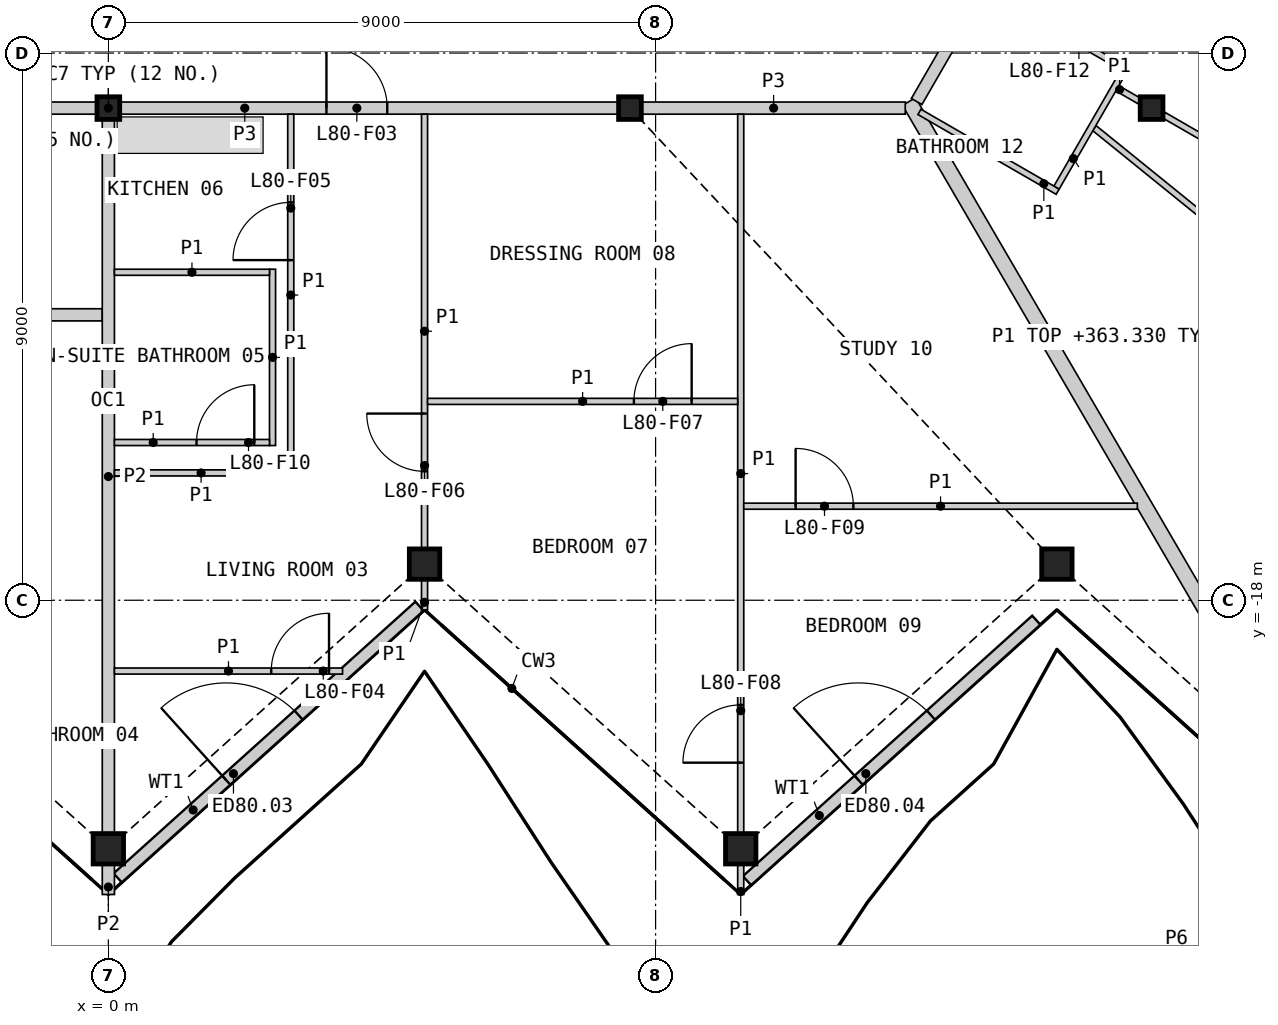
"""IFC4 building model, lengths in metres.
Left out: names, types, materials, properties, quantities, classifications, styles, units other than length and angle.
Written with IfcOpenShell. Run it as: python <this file> out.ifc"""

import sys

from ifc_helpers import new_model, si_unit, direction, frame, frame_2d, origin, origin_2d, place, context, subcontext, project, spatial, rectangle, hollow_rectangle, i_section, extrude, element, fill, save


model = new_model("IFC4")
c1 = context("Model", 3, precision=1e-05, world=origin(), true_north=direction((0.0, 1.0)))
c2 = subcontext(c1, "Body", "Model", "MODEL_VIEW")
j1 = project(units=[si_unit("LENGTHUNIT", "METRE"), si_unit("PLANEANGLEUNIT", "RADIAN")], contexts=[c1])
p1 = place(None, origin())
s1 = spatial("IfcSite", under=j1, at=p1, CompositionType="ELEMENT")
p2 = place(p1, origin())
s2 = spatial("IfcBuilding", under=s1, at=p2, CompositionType="ELEMENT")
p3 = place(p2, frame((0.0, 0.0, 361.0)))
s3 = spatial("IfcBuildingStorey", under=s2, at=p3, CompositionType="ELEMENT", Elevation=361.0)
for number, where, z_axis, x_axis in (
    (1, (0.0, -22.088, 0.0), (0.0, 0.0, 1.0), (1.0, 0.0, 0.0)),
    (2, (5.2, -17.406, 0.0), (0.0, 0.0, 1.0), (1.0, 0.0, 0.0)),
    (3, (10.4, -22.088, 0.0), (0.0, 0.0, 1.0), (1.0, 0.0, 0.0)),
    (4, (15.6, -17.406, 0.0), (0.0, 0.0, 1.0), (1.0, 0.0, 0.0)),
):
    element("IfcColumn", number, at=place(p3, frame(where, z_axis=z_axis, x_axis=x_axis)), inside=s3, PredefinedType="COLUMN", context=c2, shape_type="SweptSolid", body=[
        extrude(hollow_rectangle(XDim=0.5, YDim=0.5, WallThickness=0.03, at=origin_2d()), origin(), (0.0, 0.0, 1.0), 3.4),
    ])
for number, where, z_axis, x_axis in (
    (5, (0.0, -9.906, 0.0), (0.0, 0.0, 1.0), (1.0, 0.0, 0.0)),
    (6, (8.578, -9.906, 0.0), (0.0, 0.0, 1.0), (1.0, 0.0, 0.0)),
    (7, (17.157, -9.906, 0.0), (0.0, 0.0, 1.0), (1.0, 0.0, 0.0)),
):
    element("IfcColumn", number, at=place(p3, frame(where, z_axis=z_axis, x_axis=x_axis)), inside=s3, PredefinedType="COLUMN", context=c2, shape_type="SweptSolid", body=[
        extrude(i_section(OverallWidth=0.374, OverallDepth=0.372, WebThickness=0.016, FlangeThickness=0.026, at=origin_2d()), origin(), (0.0, 0.0, 1.0), 3.4),
    ])
p4 = place(p3, frame((0.154, -22.567, 0.0), z_axis=(0.0, 0.0, 1.0), x_axis=(0.743150529995, 0.669124270796, 0.0)))
e8 = element("IfcWall", 8, at=p4, inside=s3, PredefinedType="SOLIDWALL", context=c2, shape_type="SweptSolid", body=[
    extrude(rectangle(XDim=6.678, YDim=0.2, at=frame_2d((3.339, 0.0))), origin(), (0.0, 0.0, 1.0), 2.634),
])
p5 = place(p4, frame((2.402, 0.0, 0.0)))
e9 = element("IfcOpeningElement", 9, at=p5, cuts=e8, PredefinedType="OPENING", context=c2, shape_type="SweptSolid", body=[
    extrude(rectangle(XDim=1.6, YDim=2.25, at=frame_2d((0.8, 1.125))), frame((0.0, 0.11, 0.0), z_axis=(0.0, -1.0, 0.0), x_axis=(1.0, 0.0, 0.0)), (0.0, 0.0, 1.0), 0.22),
])
p6 = place(p3, frame((10.503, -22.612, 0.0), z_axis=(0.0, 0.0, 1.0), x_axis=(0.743148117717, 0.669126949939, 0.0)))
e10 = element("IfcWall", 10, at=p6, inside=s3, PredefinedType="SOLIDWALL", context=c2, shape_type="SweptSolid", body=[
    extrude(rectangle(XDim=6.402, YDim=0.2, at=frame_2d((3.201, 0.0))), origin(), (0.0, 0.0, 1.0), 2.634),
])
p7 = place(p6, frame((2.469, 0.0, 0.0)))
e11 = element("IfcOpeningElement", 11, at=p7, cuts=e10, PredefinedType="OPENING", context=c2, shape_type="SweptSolid", body=[
    extrude(rectangle(XDim=1.6, YDim=2.25, at=frame_2d((0.8, 1.125))), frame((0.0, 0.11, 0.0), z_axis=(0.0, -1.0, 0.0), x_axis=(1.0, 0.0, 0.0)), (0.0, 0.0, 1.0), 0.22),
])
p8 = place(p3, frame((13.168, -9.798, 0.0), z_axis=(0.0, 0.0, 1.0), x_axis=(0.503632750219, -0.863917850786, 0.0)))
e12 = element("IfcWall", 12, at=p8, inside=s3, PredefinedType="PARTITIONING", context=c2, shape_type="SweptSolid", body=[
    extrude(rectangle(XDim=14.972, YDim=0.25, at=frame_2d((7.486, 0.0))), origin(), (0.0, 0.0, 1.0), 2.33),
])
p9 = place(p3, frame((-8.382, -9.906, 0.0), z_axis=(0.0, 0.0, 1.0), x_axis=(1.0, 0.0, 0.0)))
e13 = element("IfcWall", 13, at=p9, inside=s3, PredefinedType="PARTITIONING", context=c2, shape_type="SweptSolid", body=[
    extrude(rectangle(XDim=8.185, YDim=0.2, at=frame_2d((4.092, 0.0))), origin(), (0.0, 0.0, 1.0), 3.1),
])
p10 = place(p9, frame((3.567, 0.0, 0.0)))
e14 = element("IfcOpeningElement", 14, at=p10, cuts=e13, PredefinedType="OPENING", context=c2, shape_type="SweptSolid", body=[
    extrude(rectangle(XDim=0.95, YDim=2.1, at=frame_2d((0.475, 1.05))), frame((0.0, 0.11, 0.0), z_axis=(0.0, -1.0, 0.0), x_axis=(1.0, 0.0, 0.0)), (0.0, 0.0, 1.0), 0.22),
])
p11 = place(p3, frame((0.197, -9.906, 0.0), z_axis=(0.0, 0.0, 1.0), x_axis=(1.0, 0.0, 0.0)))
e15 = element("IfcWall", 15, at=p11, inside=s3, PredefinedType="PARTITIONING", context=c2, shape_type="SweptSolid", body=[
    extrude(rectangle(XDim=8.185, YDim=0.2, at=frame_2d((4.092, 0.0))), origin(), (0.0, 0.0, 1.0), 3.1),
])
p12 = place(p11, frame((3.39, 0.0, 0.0)))
e16 = element("IfcOpeningElement", 16, at=p12, cuts=e15, PredefinedType="OPENING", context=c2, shape_type="SweptSolid", body=[
    extrude(rectangle(XDim=1.0, YDim=2.1, at=frame_2d((0.5, 1.05))), frame((0.0, 0.11, 0.0), z_axis=(0.0, -1.0, 0.0), x_axis=(1.0, 0.0, 0.0)), (0.0, 0.0, 1.0), 0.22),
])
p13 = place(p3, frame((8.775, -9.906, 0.0), z_axis=(0.0, 0.0, 1.0), x_axis=(1.0, 0.0, 0.0)))
e17 = element("IfcWall", 17, at=p13, inside=s3, PredefinedType="PARTITIONING", context=c2, shape_type="SweptSolid", body=[
    extrude(rectangle(XDim=4.331, YDim=0.2, at=frame_2d((2.165, 0.0))), origin(), (0.0, 0.0, 1.0), 3.1),
])
p14 = place(p3, frame((13.293, -9.797, 0.0), z_axis=(0.0, 0.0, 1.0), x_axis=(0.499977520935, 0.86603838169, 0.0)))
e18 = element("IfcWall", 18, at=p14, inside=s3, PredefinedType="PARTITIONING", context=c2, shape_type="SweptSolid", body=[
    extrude(rectangle(XDim=3.701, YDim=0.2, at=frame_2d((1.851, 0.0))), origin(), (0.0, 0.0, 1.0), 3.1),
])
p15 = place(p14, frame((2.451, 0.0, 0.0)))
e19 = element("IfcOpeningElement", 19, at=p15, cuts=e18, PredefinedType="OPENING", context=c2, shape_type="SweptSolid", body=[
    extrude(rectangle(XDim=1.0, YDim=2.1, at=frame_2d((0.5, 1.05))), frame((0.0, 0.11, 0.0), z_axis=(0.0, -1.0, 0.0), x_axis=(1.0, 0.0, 0.0)), (0.0, 0.0, 1.0), 0.22),
])
p16 = place(p3, frame((-15.094, -13.306, 0.0), z_axis=(0.0, 0.0, 1.0), x_axis=(1.0, 0.0, 0.0)))
e20 = element("IfcWall", 20, at=p16, inside=s3, PredefinedType="PARTITIONING", context=c2, shape_type="SweptSolid", body=[
    extrude(rectangle(XDim=14.994, YDim=0.2, at=frame_2d((7.497, 0.0))), origin(), (0.0, 0.0, 1.0), 2.33),
])
p17 = place(p16, frame((6.27, 0.0, 0.0)))
e21 = element("IfcOpeningElement", 21, at=p17, cuts=e20, PredefinedType="OPENING", context=c2, shape_type="SweptSolid", body=[
    extrude(rectangle(XDim=0.95, YDim=2.1, at=frame_2d((0.475, 1.05))), frame((0.0, 0.11, 0.0), z_axis=(0.0, -1.0, 0.0), x_axis=(1.0, 0.0, 0.0)), (0.0, 0.0, 1.0), 0.22),
])
p18 = place(p3, frame((0.0, -21.828, 0.0), z_axis=(0.0, 0.0, 1.0), x_axis=(0.0, 1.0, 0.0)))
e22 = element("IfcWall", 22, at=p18, inside=s3, PredefinedType="PARTITIONING", context=c2, shape_type="SweptSolid", body=[
    extrude(rectangle(XDim=11.725, YDim=0.2, at=frame_2d((5.863, 0.0))), origin(), (0.0, 0.0, 1.0), 2.33),
])
p19 = place(p3, frame((0.0, -22.839, 0.0), z_axis=(0.0, 0.0, 1.0), x_axis=(0.0, 1.0, 0.0)))
e23 = element("IfcWall", 23, at=p19, inside=s3, PredefinedType="PARTITIONING", context=c2, shape_type="SweptSolid", body=[
    extrude(rectangle(XDim=0.491, YDim=0.2, at=frame_2d((0.246, 0.0))), origin(), (0.0, 0.0, 1.0), 2.33),
])
p20 = place(p3, frame((16.216, -10.234, 0.0), z_axis=(0.0, 0.0, 1.0), x_axis=(0.777145059662, -0.629321504672, 0.0)))
e24 = element("IfcWall", 24, at=p20, inside=s3, PredefinedType="PARTITIONING", context=c2, shape_type="SweptSolid", body=[
    extrude(rectangle(XDim=12.59, YDim=0.1, at=frame_2d((6.295, 0.0))), origin(), (0.0, 0.0, 1.0), 2.33),
])
p21 = place(p20, frame((7.074, 0.0, 0.0)))
e25 = element("IfcOpeningElement", 25, at=p21, cuts=e24, PredefinedType="OPENING", context=c2, shape_type="SweptSolid", body=[
    extrude(rectangle(XDim=0.95, YDim=2.1, at=frame_2d((0.475, 1.05))), frame((0.0, 0.06, 0.0), z_axis=(0.0, -1.0, 0.0), x_axis=(1.0, 0.0, 0.0)), (0.0, 0.0, 1.0), 0.12),
])
p22 = place(p3, frame((10.4, -21.828, 0.0), z_axis=(0.0, 0.0, 1.0), x_axis=(0.0, 1.0, 0.0)))
e26 = element("IfcWall", 26, at=p22, inside=s3, PredefinedType="PARTITIONING", context=c2, shape_type="SweptSolid", body=[
    extrude(rectangle(XDim=11.822, YDim=0.1, at=frame_2d((5.911, 0.0))), origin(), (0.0, 0.0, 1.0), 2.33),
])
p23 = place(p22, frame((1.156, 0.0, 0.0)))
e27 = element("IfcOpeningElement", 27, at=p23, cuts=e26, PredefinedType="OPENING", context=c2, shape_type="SweptSolid", body=[
    extrude(rectangle(XDim=0.95, YDim=2.1, at=frame_2d((0.475, 1.05))), frame((0.0, 0.06, 0.0), z_axis=(0.0, -1.0, 0.0), x_axis=(1.0, 0.0, 0.0)), (0.0, 0.0, 1.0), 0.12),
])
p24 = place(p3, frame((17.354, -10.019, 0.0), z_axis=(0.0, 0.0, 1.0), x_axis=(0.866019680922, -0.500009912158, 0.0)))
e28 = element("IfcWall", 28, at=p24, inside=s3, PredefinedType="PARTITIONING", context=c2, shape_type="SweptSolid", body=[
    extrude(rectangle(XDim=10.881, YDim=0.1, at=frame_2d((5.44, 0.0))), origin(), (0.0, 0.0, 1.0), 2.33),
])
p25 = place(p24, frame((1.655, 0.0, 0.0)))
e29 = element("IfcOpeningElement", 29, at=p25, cuts=e28, PredefinedType="OPENING", context=c2, shape_type="SweptSolid", body=[
    extrude(rectangle(XDim=0.95, YDim=2.1, at=frame_2d((0.475, 1.05))), frame((0.0, 0.06, 0.0), z_axis=(0.0, -1.0, 0.0), x_axis=(1.0, 0.0, 0.0)), (0.0, 0.0, 1.0), 0.12),
])
p26 = place(p3, frame((5.2, -17.146, 0.0), z_axis=(0.0, 0.0, 1.0), x_axis=(0.0, 1.0, 0.0)))
e30 = element("IfcWall", 30, at=p26, inside=s3, PredefinedType="PARTITIONING", context=c2, shape_type="SweptSolid", body=[
    extrude(rectangle(XDim=7.14, YDim=0.1, at=frame_2d((3.57, 0.0))), origin(), (0.0, 0.0, 1.0), 2.33),
])
p27 = place(p26, frame((1.266, 0.0, 0.0)))
e31 = element("IfcOpeningElement", 31, at=p27, cuts=e30, PredefinedType="OPENING", context=c2, shape_type="SweptSolid", body=[
    extrude(rectangle(XDim=0.95, YDim=2.1, at=frame_2d((0.475, 1.05))), frame((0.0, 0.06, 0.0), z_axis=(0.0, -1.0, 0.0), x_axis=(1.0, 0.0, 0.0)), (0.0, 0.0, 1.0), 0.12),
])
p28 = place(p3, frame((10.45, -16.453, 0.0), z_axis=(0.0, 0.0, 1.0), x_axis=(1.0, 0.0, 0.0)))
e32 = element("IfcWall", 32, at=p28, inside=s3, PredefinedType="PARTITIONING", context=c2, shape_type="SweptSolid", body=[
    extrude(rectangle(XDim=6.473, YDim=0.1, at=frame_2d((3.236, 0.0))), origin(), (0.0, 0.0, 1.0), 2.33),
])
p29 = place(p28, frame((0.853, 0.0, 0.0)))
e33 = element("IfcOpeningElement", 33, at=p29, cuts=e32, PredefinedType="OPENING", context=c2, shape_type="SweptSolid", body=[
    extrude(rectangle(XDim=0.95, YDim=2.1, at=frame_2d((0.475, 1.05))), frame((0.0, 0.06, 0.0), z_axis=(0.0, -1.0, 0.0), x_axis=(1.0, 0.0, 0.0)), (0.0, 0.0, 1.0), 0.12),
])
p30 = place(p3, frame((3.0, -15.956, 0.0), z_axis=(0.0, 0.0, 1.0), x_axis=(0.0, 1.0, 0.0)))
e34 = element("IfcWall", 34, at=p30, inside=s3, PredefinedType="PARTITIONING", context=c2, shape_type="SweptSolid", body=[
    extrude(rectangle(XDim=5.95, YDim=0.1, at=frame_2d((2.975, 0.0))), origin(), (0.0, 0.0, 1.0), 2.33),
])
p31 = place(p30, frame((3.55, 0.0, 0.0)))
e35 = element("IfcOpeningElement", 35, at=p31, cuts=e34, PredefinedType="OPENING", context=c2, shape_type="SweptSolid", body=[
    extrude(rectangle(XDim=0.95, YDim=2.1, at=frame_2d((0.475, 1.05))), frame((0.0, 0.06, 0.0), z_axis=(0.0, -1.0, 0.0), x_axis=(1.0, 0.0, 0.0)), (0.0, 0.0, 1.0), 0.12),
])
p32 = place(p3, frame((5.25, -14.729, 0.0), z_axis=(0.0, 0.0, 1.0), x_axis=(1.0, 0.0, 0.0)))
e36 = element("IfcWall", 36, at=p32, inside=s3, PredefinedType="PARTITIONING", context=c2, shape_type="SweptSolid", body=[
    extrude(rectangle(XDim=5.1, YDim=0.1, at=frame_2d((2.55, 0.0))), origin(), (0.0, 0.0, 1.0), 2.33),
])
p33 = place(p32, frame((3.393, 0.0, 0.0)))
e37 = element("IfcOpeningElement", 37, at=p33, cuts=e36, PredefinedType="OPENING", context=c2, shape_type="SweptSolid", body=[
    extrude(rectangle(XDim=0.95, YDim=2.1, at=frame_2d((0.475, 1.05))), frame((0.0, 0.06, 0.0), z_axis=(0.0, -1.0, 0.0), x_axis=(1.0, 0.0, 0.0)), (0.0, 0.0, 1.0), 0.12),
])
p34 = place(p3, frame((0.1, -19.164, 0.0), z_axis=(0.0, 0.0, 1.0), x_axis=(1.0, 0.0, 0.0)))
e38 = element("IfcWall", 38, at=p34, inside=s3, PredefinedType="PARTITIONING", context=c2, shape_type="SweptSolid", body=[
    extrude(rectangle(XDim=3.751, YDim=0.1, at=frame_2d((1.876, 0.0))), origin(), (0.0, 0.0, 1.0), 2.33),
])
p35 = place(p34, frame((2.579, 0.0, 0.0)))
e39 = element("IfcOpeningElement", 39, at=p35, cuts=e38, PredefinedType="OPENING", context=c2, shape_type="SweptSolid", body=[
    extrude(rectangle(XDim=0.95, YDim=2.1, at=frame_2d((0.475, 1.05))), frame((0.0, 0.06, 0.0), z_axis=(0.0, -1.0, 0.0), x_axis=(1.0, 0.0, 0.0)), (0.0, 0.0, 1.0), 0.12),
])
p36 = place(p3, frame((0.1, -15.906, 0.0), z_axis=(0.0, 0.0, 1.0), x_axis=(1.0, 0.0, 0.0)))
e40 = element("IfcWall", 40, at=p36, inside=s3, PredefinedType="PARTITIONING", context=c2, shape_type="SweptSolid", body=[
    extrude(rectangle(XDim=2.85, YDim=0.1, at=frame_2d((1.425, 0.0))), origin(), (0.0, 0.0, 1.0), 2.33),
])
p37 = place(p3, frame((2.7, -15.456, 0.0), z_axis=(0.0, 0.0, 1.0), x_axis=(0.0, 1.0, 0.0)))
e41 = element("IfcWall", 41, at=p37, inside=s3, PredefinedType="PARTITIONING", context=c2, shape_type="SweptSolid", body=[
    extrude(rectangle(XDim=2.9, YDim=0.1, at=frame_2d((1.45, 0.0))), origin(), (0.0, 0.0, 1.0), 2.33),
])
p38 = place(p3, frame((14.467, -7.964, 0.0), z_axis=(0.0, 0.0, 1.0), x_axis=(0.86601223543, -0.500022807565, 0.0)))
e42 = element("IfcWall", 42, at=p38, inside=s3, PredefinedType="PARTITIONING", context=c2, shape_type="SweptSolid", body=[
    extrude(rectangle(XDim=2.65, YDim=0.1, at=frame_2d((1.325, 0.0))), origin(), (0.0, 0.0, 1.0), 2.33),
])
p39 = place(p38, frame((1.014, 0.0, 0.0)))
e43 = element("IfcOpeningElement", 43, at=p39, cuts=e42, PredefinedType="OPENING", context=c2, shape_type="SweptSolid", body=[
    extrude(rectangle(XDim=0.95, YDim=2.1, at=frame_2d((0.475, 1.05))), frame((0.0, 0.06, 0.0), z_axis=(0.0, -1.0, 0.0), x_axis=(1.0, 0.0, 0.0)), (0.0, 0.0, 1.0), 0.12),
])
p40 = place(p3, frame((0.1, -12.606, 0.0), z_axis=(0.0, 0.0, 1.0), x_axis=(1.0, 0.0, 0.0)))
e44 = element("IfcWall", 44, at=p40, inside=s3, PredefinedType="PARTITIONING", context=c2, shape_type="SweptSolid", body=[
    extrude(rectangle(XDim=2.55, YDim=0.1, at=frame_2d((1.275, 0.0))), origin(), (0.0, 0.0, 1.0), 2.33),
])
p41 = place(p3, frame((0.1, -15.406, 0.0), z_axis=(0.0, 0.0, 1.0), x_axis=(1.0, 0.0, 0.0)))
e45 = element("IfcWall", 45, at=p41, inside=s3, PredefinedType="PARTITIONING", context=c2, shape_type="SweptSolid", body=[
    extrude(rectangle(XDim=2.55, YDim=0.1, at=frame_2d((1.275, 0.0))), origin(), (0.0, 0.0, 1.0), 2.33),
])
p42 = place(p41, frame((1.35, 0.0, 0.0)))
e46 = element("IfcOpeningElement", 46, at=p42, cuts=e45, PredefinedType="OPENING", context=c2, shape_type="SweptSolid", body=[
    extrude(rectangle(XDim=0.95, YDim=2.1, at=frame_2d((0.475, 1.05))), frame((0.0, 0.06, 0.0), z_axis=(0.0, -1.0, 0.0), x_axis=(1.0, 0.0, 0.0)), (0.0, 0.0, 1.0), 0.12),
])
p43 = place(p3, frame((13.339, -9.968, 0.0), z_axis=(0.0, 0.0, 1.0), x_axis=(0.866013657776, -0.500020344131, 0.0)))
e47 = element("IfcWall", 47, at=p43, inside=s3, PredefinedType="PARTITIONING", context=c2, shape_type="SweptSolid", body=[
    extrude(rectangle(XDim=2.625, YDim=0.1, at=frame_2d((1.312, 0.0))), origin(), (0.0, 0.0, 1.0), 2.33),
])
p44 = place(p3, frame((15.594, -11.212, 0.0), z_axis=(0.0, 0.0, 1.0), x_axis=(0.499981787252, 0.866035918664, 0.0)))
e48 = element("IfcWall", 48, at=p44, inside=s3, PredefinedType="PARTITIONING", context=c2, shape_type="SweptSolid", body=[
    extrude(rectangle(XDim=2.2, YDim=0.1, at=frame_2d((1.1, 0.0))), origin(), (0.0, 0.0, 1.0), 2.33),
])
for number, where, z_axis, x_axis in (
    (49, (10.4, -22.839, 0.0), (0.0, 0.0, 1.0), (0.0, 1.0, 0.0)),
    (50, (5.2, -18.157, 0.0), (0.0, 0.0, 1.0), (0.0, 1.0, 0.0)),
):
    element("IfcWall", number, at=place(p3, frame(where, z_axis=z_axis, x_axis=x_axis)), inside=s3, PredefinedType="PARTITIONING", context=c2, shape_type="SweptSolid", body=[
        extrude(rectangle(XDim=0.491, YDim=0.1, at=frame_2d((0.246, 0.0))), origin(), (0.0, 0.0, 1.0), 2.33),
    ])
p45 = place(p3, frame((16.594, -9.581, 0.0), z_axis=(0.0, 0.0, 1.0), x_axis=(0.866137484628, -0.499805820016, 0.0)))
e51 = element("IfcWall", 51, at=p45, inside=s3, PredefinedType="PARTITIONING", context=c2, shape_type="SweptSolid", body=[
    extrude(rectangle(XDim=0.423, YDim=0.1, at=frame_2d((0.211, 0.0))), origin(), (0.0, 0.0, 1.0), 2.33),
])
p46 = place(p5, origin())
e52 = element("IfcDoor", 52, at=p46, inside=s3, OperationType="DOUBLE_DOOR_SINGLE_SWING", PredefinedType="DOOR", context=c2, shape_type="SweptSolid", body=[
    extrude(rectangle(XDim=1.6, YDim=2.25, at=frame_2d((0.8, 1.125))), frame((0.0, 0.025, 0.0), z_axis=(0.0, -1.0, 0.0), x_axis=(1.0, 0.0, 0.0)), (0.0, 0.0, 1.0), 0.05),
])
fill(e9, e52)
p47 = place(p7, origin())
e53 = element("IfcDoor", 53, at=p47, inside=s3, OperationType="DOUBLE_DOOR_SINGLE_SWING", PredefinedType="DOOR", context=c2, shape_type="SweptSolid", body=[
    extrude(rectangle(XDim=1.6, YDim=2.25, at=frame_2d((0.8, 1.125))), frame((0.0, 0.025, 0.0), z_axis=(0.0, -1.0, 0.0), x_axis=(1.0, 0.0, 0.0)), (0.0, 0.0, 1.0), 0.05),
])
fill(e11, e53)
p48 = place(p12, origin())
e54 = element("IfcDoor", 54, at=p48, inside=s3, OperationType="SINGLE_SWING_LEFT", PredefinedType="DOOR", context=c2, shape_type="SweptSolid", body=[
    extrude(rectangle(XDim=1.0, YDim=2.1, at=frame_2d((0.5, 1.05))), frame((0.0, 0.025, 0.0), z_axis=(0.0, -1.0, 0.0), x_axis=(1.0, 0.0, 0.0)), (0.0, 0.0, 1.0), 0.05),
])
fill(e16, e54)
p49 = place(p35, origin())
e55 = element("IfcDoor", 55, at=p49, inside=s3, OperationType="SINGLE_SWING_RIGHT", PredefinedType="DOOR", context=c2, shape_type="SweptSolid", body=[
    extrude(rectangle(XDim=0.95, YDim=2.1, at=frame_2d((0.475, 1.05))), frame((0.0, 0.025, 0.0), z_axis=(0.0, -1.0, 0.0), x_axis=(1.0, 0.0, 0.0)), (0.0, 0.0, 1.0), 0.05),
])
fill(e39, e55)
p50 = place(p31, origin())
e56 = element("IfcDoor", 56, at=p50, inside=s3, OperationType="SINGLE_SWING_LEFT", PredefinedType="DOOR", context=c2, shape_type="SweptSolid", body=[
    extrude(rectangle(XDim=0.95, YDim=2.1, at=frame_2d((0.475, 1.05))), frame((0.0, 0.025, 0.0), z_axis=(0.0, -1.0, 0.0), x_axis=(1.0, 0.0, 0.0)), (0.0, 0.0, 1.0), 0.05),
])
fill(e35, e56)
p51 = place(p27, origin())
e57 = element("IfcDoor", 57, at=p51, inside=s3, OperationType="SINGLE_SWING_RIGHT", PredefinedType="DOOR", context=c2, shape_type="SweptSolid", body=[
    extrude(rectangle(XDim=0.95, YDim=2.1, at=frame_2d((0.475, 1.05))), frame((0.0, 0.025, 0.0), z_axis=(0.0, -1.0, 0.0), x_axis=(1.0, 0.0, 0.0)), (0.0, 0.0, 1.0), 0.05),
])
fill(e31, e57)
p52 = place(p33, origin())
e58 = element("IfcDoor", 58, at=p52, inside=s3, OperationType="SINGLE_SWING_RIGHT", PredefinedType="DOOR", context=c2, shape_type="SweptSolid", body=[
    extrude(rectangle(XDim=0.95, YDim=2.1, at=frame_2d((0.475, 1.05))), frame((0.0, 0.025, 0.0), z_axis=(0.0, -1.0, 0.0), x_axis=(1.0, 0.0, 0.0)), (0.0, 0.0, 1.0), 0.05),
])
fill(e37, e58)
p53 = place(p23, origin())
e59 = element("IfcDoor", 59, at=p53, inside=s3, OperationType="SINGLE_SWING_LEFT", PredefinedType="DOOR", context=c2, shape_type="SweptSolid", body=[
    extrude(rectangle(XDim=0.95, YDim=2.1, at=frame_2d((0.475, 1.05))), frame((0.0, 0.025, 0.0), z_axis=(0.0, -1.0, 0.0), x_axis=(1.0, 0.0, 0.0)), (0.0, 0.0, 1.0), 0.05),
])
fill(e27, e59)
p54 = place(p29, origin())
e60 = element("IfcDoor", 60, at=p54, inside=s3, OperationType="SINGLE_SWING_LEFT", PredefinedType="DOOR", context=c2, shape_type="SweptSolid", body=[
    extrude(rectangle(XDim=0.95, YDim=2.1, at=frame_2d((0.475, 1.05))), frame((0.0, 0.025, 0.0), z_axis=(0.0, -1.0, 0.0), x_axis=(1.0, 0.0, 0.0)), (0.0, 0.0, 1.0), 0.05),
])
fill(e33, e60)
p55 = place(p42, origin())
e61 = element("IfcDoor", 61, at=p55, inside=s3, OperationType="SINGLE_SWING_RIGHT", PredefinedType="DOOR", context=c2, shape_type="SweptSolid", body=[
    extrude(rectangle(XDim=0.95, YDim=2.1, at=frame_2d((0.475, 1.05))), frame((0.0, 0.025, 0.0), z_axis=(0.0, -1.0, 0.0), x_axis=(1.0, 0.0, 0.0)), (0.0, 0.0, 1.0), 0.05),
])
fill(e46, e61)
save(model, sys.argv[1])
